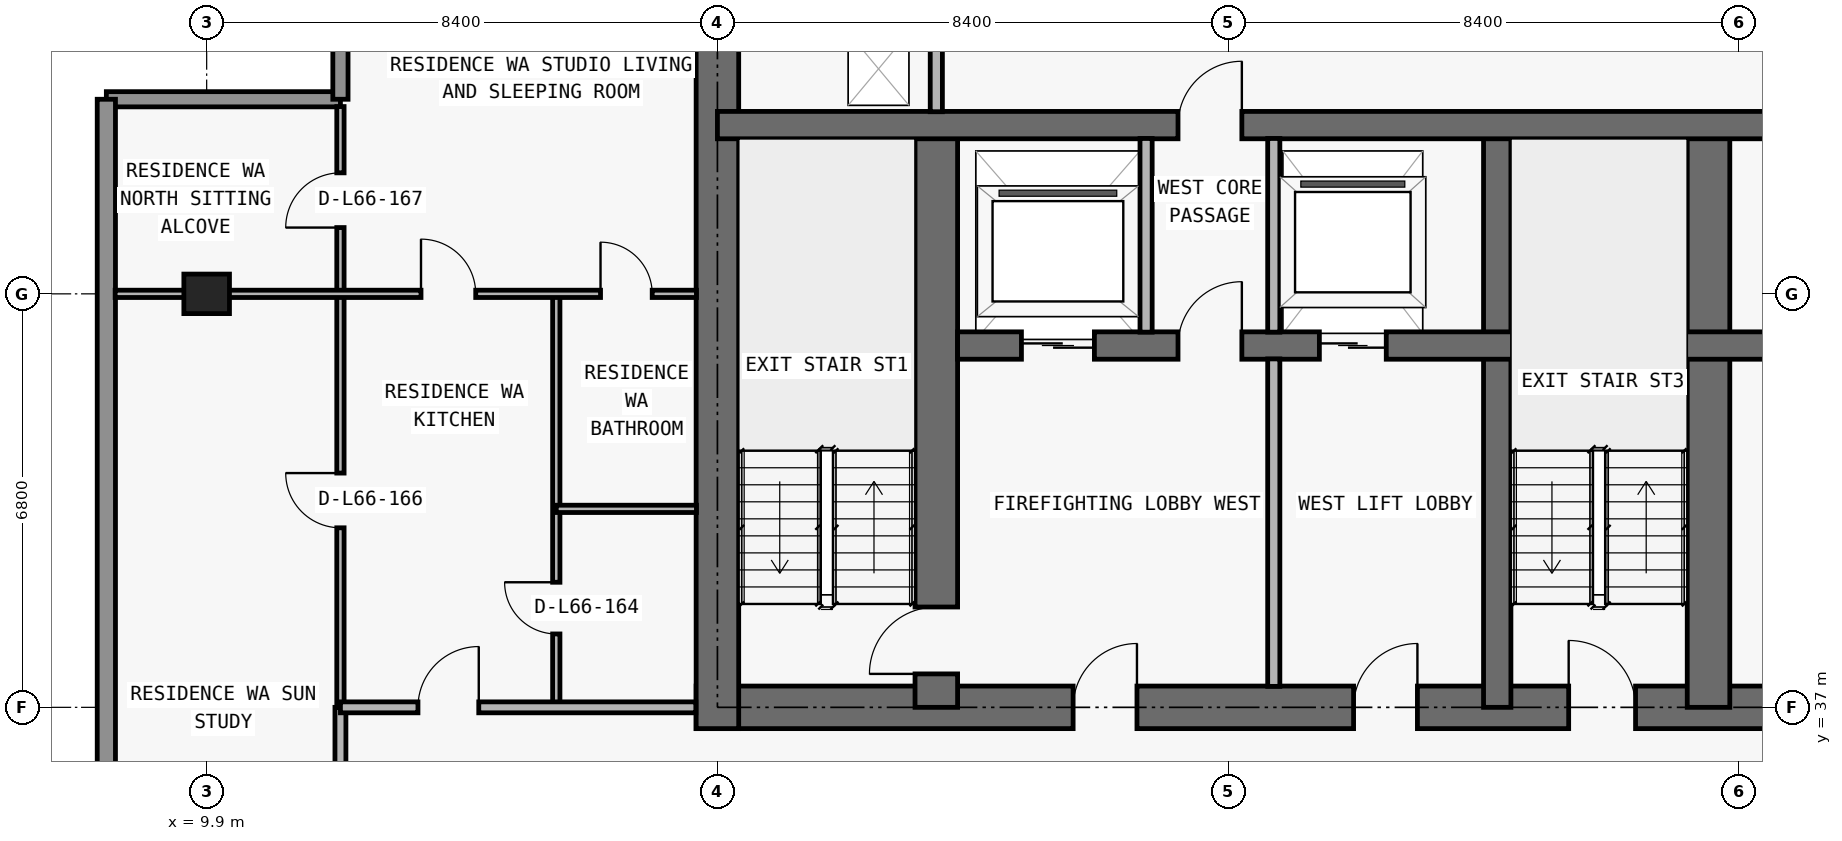
"""IFC4 building model, lengths in metres.
Left out: names, types, materials, properties, quantities, classifications, styles, units other than length and angle.
Written with IfcOpenShell. Run it as: python <this file> out.ifc"""

import sys

from ifc_helpers import new_model, si_unit, direction, frame, frame_2d, origin, origin_2d, place, context, subcontext, project, spatial, rectangle, extrude, element, fill, save


model = new_model("IFC4")
c1 = context("Model", 3, precision=1e-05, world=origin(), true_north=direction((0.0, 1.0)))
c2 = subcontext(c1, "Body", "Model", "MODEL_VIEW")
j1 = project(units=[si_unit("LENGTHUNIT", "METRE"), si_unit("PLANEANGLEUNIT", "RADIAN")], contexts=[c1])
p1 = place(None, origin())
s1 = spatial("IfcSite", under=j1, at=p1, CompositionType="ELEMENT")
p2 = place(p1, origin())
s2 = spatial("IfcBuilding", under=s1, at=p2, CompositionType="ELEMENT")
p3 = place(p2, frame((0.0, 0.0, 236.4)))
s3 = spatial("IfcBuildingStorey", under=s2, at=p3, CompositionType="ELEMENT", Elevation=236.4)
p4 = place(p3, frame((9.9, 43.8, 0.0), z_axis=(0.0, 0.0, 1.0), x_axis=(1.0, 0.0, 0.0)))
e1 = element("IfcColumn", 1, at=p4, inside=s3, PredefinedType="COLUMN", context=c2, shape_type="SweptSolid", body=[
    extrude(rectangle(XDim=0.75, YDim=0.65, at=origin_2d()), origin(), (0.0, 0.0, 1.0), 3.05),
])
p5 = place(p3, frame((17.95, 37.0, 0.0), z_axis=(0.0, 0.0, 1.0), x_axis=(1.0, 0.0, 0.0)))
e2 = element("IfcWall", 2, at=p5, inside=s3, PredefinedType="SHEAR", context=c2, shape_type="SweptSolid", body=[
    extrude(rectangle(XDim=41.9, YDim=0.7, at=frame_2d((20.95, 0.0))), origin(), (0.0, 0.0, 1.0), 3.05),
])
p6 = place(p5, frame((14.35, 0.0, 0.0)))
e3 = element("IfcOpeningElement", 3, at=p6, cuts=e2, PredefinedType="OPENING", context=c2, shape_type="SweptSolid", body=[
    extrude(rectangle(XDim=1.1, YDim=2.15, at=frame_2d((0.55, 1.075))), frame((0.0, 0.36, 0.0), z_axis=(0.0, -1.0, 0.0), x_axis=(1.0, 0.0, 0.0)), (0.0, 0.0, 1.0), 0.72),
])
p7 = place(p5, frame((6.2, 0.0, 0.0)))
e4 = element("IfcOpeningElement", 4, at=p7, cuts=e2, PredefinedType="OPENING", context=c2, shape_type="SweptSolid", body=[
    extrude(rectangle(XDim=1.05, YDim=2.15, at=frame_2d((0.525, 1.075))), frame((0.0, 0.36, 0.0), z_axis=(0.0, -1.0, 0.0), x_axis=(1.0, 0.0, 0.0)), (0.0, 0.0, 1.0), 0.72),
])
p8 = place(p5, frame((34.7, 0.0, 0.0)))
e5 = element("IfcOpeningElement", 5, at=p8, cuts=e2, PredefinedType="OPENING", context=c2, shape_type="SweptSolid", body=[
    extrude(rectangle(XDim=1.05, YDim=2.15, at=frame_2d((0.525, 1.075))), frame((0.0, 0.36, 0.0), z_axis=(0.0, -1.0, 0.0), x_axis=(1.0, 0.0, 0.0)), (0.0, 0.0, 1.0), 0.72),
])
p9 = place(p5, frame((10.812, 0.0, 0.0)))
e6 = element("IfcOpeningElement", 6, at=p9, cuts=e2, PredefinedType="OPENING", context=c2, shape_type="SweptSolid", body=[
    extrude(rectangle(XDim=1.05, YDim=2.15, at=frame_2d((0.525, 1.075))), frame((0.0, 0.36, 0.0), z_axis=(0.0, -1.0, 0.0), x_axis=(1.0, 0.0, 0.0)), (0.0, 0.0, 1.0), 0.72),
])
p10 = place(p5, frame((24.05, 0.0, 0.0)))
e7 = element("IfcOpeningElement", 7, at=p10, cuts=e2, PredefinedType="OPENING", context=c2, shape_type="SweptSolid", body=[
    extrude(rectangle(XDim=1.05, YDim=2.15, at=frame_2d((0.525, 1.075))), frame((0.0, 0.36, 0.0), z_axis=(0.0, -1.0, 0.0), x_axis=(1.0, 0.0, 0.0)), (0.0, 0.0, 1.0), 0.72),
])
p11 = place(p3, frame((18.3, 36.65, 0.0), z_axis=(0.0, 0.0, 1.0), x_axis=(0.0, 1.0, 0.0)))
e8 = element("IfcWall", 8, at=p11, inside=s3, PredefinedType="SHEAR", context=c2, shape_type="SweptSolid", body=[
    extrude(rectangle(XDim=13.95, YDim=0.7, at=frame_2d((6.975, 0.0))), origin(), (0.0, 0.0, 1.0), 3.05),
])
p12 = place(p3, frame((21.9, 37.0, 0.0), z_axis=(0.0, 0.0, 1.0), x_axis=(0.0, 1.0, 0.0)))
e9 = element("IfcWall", 9, at=p12, inside=s3, PredefinedType="SHEAR", context=c2, shape_type="SweptSolid", body=[
    extrude(rectangle(XDim=9.575, YDim=0.7, at=frame_2d((4.788, 0.0))), origin(), (0.0, 0.0, 1.0), 3.05),
])
p13 = place(p12, frame((0.55, 0.0, 0.0)))
e10 = element("IfcOpeningElement", 10, at=p13, cuts=e9, PredefinedType="OPENING", context=c2, shape_type="SweptSolid", body=[
    extrude(rectangle(XDim=1.1, YDim=2.15, at=frame_2d((0.55, 1.075))), frame((0.0, 0.36, 0.0), z_axis=(0.0, -1.0, 0.0), x_axis=(1.0, 0.0, 0.0)), (0.0, 0.0, 1.0), 0.72),
])
p14 = place(p3, frame((31.125, 37.0, 0.0), z_axis=(0.0, 0.0, 1.0), x_axis=(0.0, 1.0, 0.0)))
e11 = element("IfcWall", 11, at=p14, inside=s3, PredefinedType="SHEAR", context=c2, shape_type="SweptSolid", body=[
    extrude(rectangle(XDim=9.575, YDim=0.45, at=frame_2d((4.788, 0.0))), origin(), (0.0, 0.0, 1.0), 3.05),
])
p15 = place(p3, frame((34.6, 37.0, 0.0), z_axis=(0.0, 0.0, 1.0), x_axis=(0.0, 1.0, 0.0)))
e12 = element("IfcWall", 12, at=p15, inside=s3, PredefinedType="SHEAR", context=c2, shape_type="SweptSolid", body=[
    extrude(rectangle(XDim=9.575, YDim=0.7, at=frame_2d((4.788, 0.0))), origin(), (0.0, 0.0, 1.0), 3.05),
])
p16 = place(p3, frame((22.25, 42.95, 0.0), z_axis=(0.0, 0.0, 1.0), x_axis=(1.0, 0.0, 0.0)))
e13 = element("IfcWall", 13, at=p16, inside=s3, PredefinedType="SHEAR", context=c2, shape_type="SweptSolid", body=[
    extrude(rectangle(XDim=33.3, YDim=0.45, at=frame_2d((16.65, 0.0))), origin(), (0.0, 0.0, 1.0), 3.05),
])
p17 = place(p16, frame((1.05, 0.0, 0.0)))
e14 = element("IfcOpeningElement", 14, at=p17, cuts=e13, PredefinedType="OPENING", context=c2, shape_type="SweptSolid", body=[
    extrude(rectangle(XDim=1.2, YDim=2.2, at=frame_2d((0.6, 1.1))), frame((0.0, 0.235, 0.0), z_axis=(0.0, -1.0, 0.0), x_axis=(1.0, 0.0, 0.0)), (0.0, 0.0, 1.0), 0.47),
])
p18 = place(p16, frame((31.05, 0.0, 0.0)))
e15 = element("IfcOpeningElement", 15, at=p18, cuts=e13, PredefinedType="OPENING", context=c2, shape_type="SweptSolid", body=[
    extrude(rectangle(XDim=1.2, YDim=2.2, at=frame_2d((0.6, 1.1))), frame((0.0, 0.235, 0.0), z_axis=(0.0, -1.0, 0.0), x_axis=(1.0, 0.0, 0.0)), (0.0, 0.0, 1.0), 0.47),
])
p19 = place(p16, frame((26.45, 0.0, 0.0)))
e16 = element("IfcOpeningElement", 16, at=p19, cuts=e13, PredefinedType="OPENING", context=c2, shape_type="SweptSolid", body=[
    extrude(rectangle(XDim=1.1, YDim=2.2, at=frame_2d((0.55, 1.1))), frame((0.0, 0.235, 0.0), z_axis=(0.0, -1.0, 0.0), x_axis=(1.0, 0.0, 0.0)), (0.0, 0.0, 1.0), 0.47),
])
p20 = place(p16, frame((5.95, 0.0, 0.0)))
e17 = element("IfcOpeningElement", 17, at=p20, cuts=e13, PredefinedType="OPENING", context=c2, shape_type="SweptSolid", body=[
    extrude(rectangle(XDim=1.1, YDim=2.2, at=frame_2d((0.55, 1.1))), frame((0.0, 0.235, 0.0), z_axis=(0.0, -1.0, 0.0), x_axis=(1.0, 0.0, 0.0)), (0.0, 0.0, 1.0), 0.47),
])
p21 = place(p16, frame((3.625, 0.0, 0.0)))
e18 = element("IfcOpeningElement", 18, at=p21, cuts=e13, PredefinedType="OPENING", context=c2, shape_type="SweptSolid", body=[
    extrude(rectangle(XDim=1.05, YDim=2.15, at=frame_2d((0.525, 1.075))), frame((0.0, 0.235, 0.0), z_axis=(0.0, -1.0, 0.0), x_axis=(1.0, 0.0, 0.0)), (0.0, 0.0, 1.0), 0.47),
])
p22 = place(p16, frame((28.675, 0.0, 0.0)))
e19 = element("IfcOpeningElement", 19, at=p22, cuts=e13, PredefinedType="OPENING", context=c2, shape_type="SweptSolid", body=[
    extrude(rectangle(XDim=1.05, YDim=2.15, at=frame_2d((0.525, 1.075))), frame((0.0, 0.235, 0.0), z_axis=(0.0, -1.0, 0.0), x_axis=(1.0, 0.0, 0.0)), (0.0, 0.0, 1.0), 0.47),
])
p23 = place(p16, frame((15.225, 0.0, 0.0)))
e20 = element("IfcOpeningElement", 20, at=p23, cuts=e13, PredefinedType="OPENING", context=c2, shape_type="SweptSolid", body=[
    extrude(rectangle(XDim=1.0, YDim=2.2, at=frame_2d((0.5, 1.1))), frame((0.0, 0.235, 0.0), z_axis=(0.0, -1.0, 0.0), x_axis=(1.0, 0.0, 0.0)), (0.0, 0.0, 1.0), 0.47),
])
p24 = place(p16, frame((21.975, 0.0, 0.0)))
e21 = element("IfcOpeningElement", 21, at=p24, cuts=e13, PredefinedType="OPENING", context=c2, shape_type="SweptSolid", body=[
    extrude(rectangle(XDim=1.0, YDim=2.2, at=frame_2d((0.5, 1.1))), frame((0.0, 0.235, 0.0), z_axis=(0.0, -1.0, 0.0), x_axis=(1.0, 0.0, 0.0)), (0.0, 0.0, 1.0), 0.47),
])
p25 = place(p3, frame((18.3, 46.575, 0.0), z_axis=(0.0, 0.0, 1.0), x_axis=(1.0, 0.0, 0.0)))
e22 = element("IfcWall", 22, at=p25, inside=s3, PredefinedType="SHEAR", context=c2, shape_type="SweptSolid", body=[
    extrude(rectangle(XDim=41.2, YDim=0.45, at=frame_2d((20.6, 0.0))), origin(), (0.0, 0.0, 1.0), 3.05),
])
p26 = place(p25, frame((7.575, 0.0, 0.0)))
e23 = element("IfcOpeningElement", 23, at=p26, cuts=e22, PredefinedType="OPENING", context=c2, shape_type="SweptSolid", body=[
    extrude(rectangle(XDim=1.05, YDim=2.15, at=frame_2d((0.525, 1.075))), frame((0.0, 0.235, 0.0), z_axis=(0.0, -1.0, 0.0), x_axis=(1.0, 0.0, 0.0)), (0.0, 0.0, 1.0), 0.47),
])
p27 = place(p25, frame((32.625, 0.0, 0.0)))
e24 = element("IfcOpeningElement", 24, at=p27, cuts=e22, PredefinedType="OPENING", context=c2, shape_type="SweptSolid", body=[
    extrude(rectangle(XDim=1.05, YDim=2.15, at=frame_2d((0.525, 1.075))), frame((0.0, 0.235, 0.0), z_axis=(0.0, -1.0, 0.0), x_axis=(1.0, 0.0, 0.0)), (0.0, 0.0, 1.0), 0.47),
])
p28 = place(p3, frame((8.25, 47.0, 0.0), z_axis=(0.0, 0.0, 1.0), x_axis=(1.0, 0.0, 0.0)))
e25 = element("IfcWall", 25, at=p28, inside=s3, PredefinedType="ELEMENTEDWALL", context=c2, shape_type="SweptSolid", body=[
    extrude(rectangle(XDim=3.85, YDim=0.25, at=frame_2d((1.925, 0.0))), origin(), (0.0, 0.0, 1.0), 3.05),
])
p29 = place(p3, frame((12.1, 47.0, 0.0), z_axis=(0.0, 0.0, 1.0), x_axis=(0.0, 1.0, 0.0)))
e26 = element("IfcWall", 26, at=p29, inside=s3, PredefinedType="ELEMENTEDWALL", context=c2, shape_type="SweptSolid", body=[
    extrude(rectangle(XDim=3.45, YDim=0.25, at=frame_2d((1.725, 0.0))), origin(), (0.0, 0.0, 1.0), 3.05),
])
p30 = place(p3, frame((8.25, 30.15, 0.0), z_axis=(0.0, 0.0, 1.0), x_axis=(0.0, 1.0, 0.0)))
e27 = element("IfcWall", 27, at=p30, inside=s3, PredefinedType="STANDARD", context=c2, shape_type="SweptSolid", body=[
    extrude(rectangle(XDim=16.85, YDim=0.3, at=frame_2d((8.425, 0.0))), origin(), (0.0, 0.0, 1.0), 3.05),
])
p31 = place(p3, frame((12.1, 34.005, 0.0), z_axis=(0.0, 0.0, 1.0), x_axis=(0.0, 1.0, 0.0)))
e28 = element("IfcWall", 28, at=p31, inside=s3, PredefinedType="PARTITIONING", context=c2, shape_type="SweptSolid", body=[
    extrude(rectangle(XDim=2.995, YDim=0.18, at=frame_2d((1.498, 0.0))), origin(), (0.0, 0.0, 1.0), 2.578),
])
p32 = place(p3, frame((12.1, 37.005, 0.0), z_axis=(0.0, 0.0, 1.0), x_axis=(0.0, 1.0, 0.0)))
e29 = element("IfcWall", 29, at=p32, inside=s3, PredefinedType="PARTITIONING", context=c2, shape_type="SweptSolid", body=[
    extrude(rectangle(XDim=9.875, YDim=0.12, at=frame_2d((4.938, 0.0))), origin(), (0.0, 0.0, 1.0), 2.578),
])
p33 = place(p32, frame((2.948, 0.0, 0.0)))
e30 = element("IfcOpeningElement", 30, at=p33, cuts=e29, PredefinedType="OPENING", context=c2, shape_type="SweptSolid", body=[
    extrude(rectangle(XDim=0.9, YDim=2.15, at=frame_2d((0.45, 1.075))), frame((0.0, 0.07, 0.0), z_axis=(0.0, -1.0, 0.0), x_axis=(1.0, 0.0, 0.0)), (0.0, 0.0, 1.0), 0.14),
])
p34 = place(p32, frame((7.885, 0.0, 0.0)))
e31 = element("IfcOpeningElement", 31, at=p34, cuts=e29, PredefinedType="OPENING", context=c2, shape_type="SweptSolid", body=[
    extrude(rectangle(XDim=0.9, YDim=2.15, at=frame_2d((0.45, 1.075))), frame((0.0, 0.07, 0.0), z_axis=(0.0, -1.0, 0.0), x_axis=(1.0, 0.0, 0.0)), (0.0, 0.0, 1.0), 0.14),
])
p35 = place(p3, frame((15.65, 37.0, 0.0), z_axis=(0.0, 0.0, 1.0), x_axis=(0.0, 1.0, 0.0)))
e32 = element("IfcWall", 32, at=p35, inside=s3, PredefinedType="PARTITIONING", context=c2, shape_type="SweptSolid", body=[
    extrude(rectangle(XDim=6.8, YDim=0.12, at=frame_2d((3.4, 0.0))), origin(), (0.0, 0.0, 1.0), 3.05),
])
p36 = place(p35, frame((1.207, 0.0, 0.0)))
e33 = element("IfcOpeningElement", 33, at=p36, cuts=e32, PredefinedType="OPENING", context=c2, shape_type="SweptSolid", body=[
    extrude(rectangle(XDim=0.85, YDim=2.1, at=frame_2d((0.425, 1.05))), frame((0.0, 0.07, 0.0), z_axis=(0.0, -1.0, 0.0), x_axis=(1.0, 0.0, 0.0)), (0.0, 0.0, 1.0), 0.14),
])
p37 = place(p3, frame((21.9, 46.795, 0.0), z_axis=(0.0, 0.0, 1.0), x_axis=(0.0, 1.0, 0.0)))
e34 = element("IfcWall", 34, at=p37, inside=s3, PredefinedType="PARTITIONING", context=c2, shape_type="SweptSolid", body=[
    extrude(rectangle(XDim=3.16, YDim=0.2, at=frame_2d((1.58, 0.0))), origin(), (0.0, 0.0, 1.0), 3.05),
])
p38 = place(p3, frame((25.35, 43.17, 0.0), z_axis=(0.0, 0.0, 1.0), x_axis=(0.0, 1.0, 0.0)))
e35 = element("IfcWall", 35, at=p38, inside=s3, PredefinedType="PARTITIONING", context=c2, shape_type="SweptSolid", body=[
    extrude(rectangle(XDim=3.185, YDim=0.2, at=frame_2d((1.593, 0.0))), origin(), (0.0, 0.0, 1.0), 3.05),
])
p39 = place(p3, frame((27.45, 37.345, 0.0), z_axis=(0.0, 0.0, 1.0), x_axis=(0.0, 1.0, 0.0)))
e36 = element("IfcWall", 36, at=p39, inside=s3, PredefinedType="PARTITIONING", context=c2, shape_type="SweptSolid", body=[
    extrude(rectangle(XDim=5.385, YDim=0.2, at=frame_2d((2.692, 0.0))), origin(), (0.0, 0.0, 1.0), 3.05),
])
p40 = place(p3, frame((27.45, 43.17, 0.0), z_axis=(0.0, 0.0, 1.0), x_axis=(0.0, 1.0, 0.0)))
e37 = element("IfcWall", 37, at=p40, inside=s3, PredefinedType="PARTITIONING", context=c2, shape_type="SweptSolid", body=[
    extrude(rectangle(XDim=3.185, YDim=0.2, at=frame_2d((1.593, 0.0))), origin(), (0.0, 0.0, 1.0), 3.05),
])
p41 = place(p3, frame((12.1, 37.0, 0.0), z_axis=(0.0, 0.0, 1.0), x_axis=(1.0, 0.0, 0.0)))
e38 = element("IfcWall", 38, at=p41, inside=s3, PredefinedType="PARTITIONING", context=c2, shape_type="SweptSolid", body=[
    extrude(rectangle(XDim=5.845, YDim=0.18, at=frame_2d((2.922, 0.0))), origin(), (0.0, 0.0, 1.0), 3.05),
])
p42 = place(p41, frame((1.275, 0.0, 0.0)))
e39 = element("IfcOpeningElement", 39, at=p42, cuts=e38, PredefinedType="OPENING", context=c2, shape_type="SweptSolid", body=[
    extrude(rectangle(XDim=1.0, YDim=2.2, at=frame_2d((0.5, 1.1))), frame((0.0, 0.1, 0.0), z_axis=(0.0, -1.0, 0.0), x_axis=(1.0, 0.0, 0.0)), (0.0, 0.0, 1.0), 0.2),
])
p43 = place(p3, frame((15.65, 40.264, 0.0), z_axis=(0.0, 0.0, 1.0), x_axis=(1.0, 0.0, 0.0)))
e40 = element("IfcWall", 40, at=p43, inside=s3, PredefinedType="PARTITIONING", context=c2, shape_type="SweptSolid", body=[
    extrude(rectangle(XDim=2.305, YDim=0.12, at=frame_2d((1.153, 0.0))), origin(), (0.0, 0.0, 1.0), 3.05),
])
p44 = place(p3, frame((8.395, 43.8, 0.0), z_axis=(0.0, 0.0, 1.0), x_axis=(1.0, 0.0, 0.0)))
e41 = element("IfcWall", 41, at=p44, inside=s3, PredefinedType="PARTITIONING", context=c2, shape_type="SweptSolid", body=[
    extrude(rectangle(XDim=9.56, YDim=0.12, at=frame_2d((4.78, 0.0))), origin(), (0.0, 0.0, 1.0), 2.418),
])
p45 = place(p44, frame((5.03, 0.0, 0.0)))
e42 = element("IfcOpeningElement", 42, at=p45, cuts=e41, PredefinedType="OPENING", context=c2, shape_type="SweptSolid", body=[
    extrude(rectangle(XDim=0.9, YDim=2.15, at=frame_2d((0.45, 1.075))), frame((0.0, 0.07, 0.0), z_axis=(0.0, -1.0, 0.0), x_axis=(1.0, 0.0, 0.0)), (0.0, 0.0, 1.0), 0.14),
])
p46 = place(p44, frame((7.982, 0.0, 0.0)))
e43 = element("IfcOpeningElement", 43, at=p46, cuts=e41, PredefinedType="OPENING", context=c2, shape_type="SweptSolid", body=[
    extrude(rectangle(XDim=0.85, YDim=2.1, at=frame_2d((0.425, 1.05))), frame((0.0, 0.07, 0.0), z_axis=(0.0, -1.0, 0.0), x_axis=(1.0, 0.0, 0.0)), (0.0, 0.0, 1.0), 0.14),
])
p47 = place(p17, origin())
e44 = element("IfcDoor", 44, at=p47, inside=s3, OperationType="DOUBLE_DOOR_SLIDING", PredefinedType="DOOR", context=c2, shape_type="SweptSolid", body=[
    extrude(rectangle(XDim=1.2, YDim=2.2, at=frame_2d((0.6, 1.1))), frame((0.0, 0.025, 0.0), z_axis=(0.0, -1.0, 0.0), x_axis=(1.0, 0.0, 0.0)), (0.0, 0.0, 1.0), 0.05),
])
fill(e14, e44)
p48 = place(p20, origin())
e45 = element("IfcDoor", 45, at=p48, inside=s3, OperationType="DOUBLE_DOOR_SLIDING", PredefinedType="DOOR", context=c2, shape_type="SweptSolid", body=[
    extrude(rectangle(XDim=1.1, YDim=2.2, at=frame_2d((0.55, 1.1))), frame((0.0, 0.025, 0.0), z_axis=(0.0, -1.0, 0.0), x_axis=(1.0, 0.0, 0.0)), (0.0, 0.0, 1.0), 0.05),
])
fill(e17, e45)
p49 = place(p6, origin())
e46 = element("IfcDoor", 46, at=p49, inside=s3, OperationType="SINGLE_SWING_LEFT", PredefinedType="DOOR", context=c2, shape_type="SweptSolid", body=[
    extrude(rectangle(XDim=1.1, YDim=2.15, at=frame_2d((0.55, 1.075))), frame((0.0, 0.025, 0.0), z_axis=(0.0, -1.0, 0.0), x_axis=(1.0, 0.0, 0.0)), (0.0, 0.0, 1.0), 0.05),
])
fill(e3, e46)
p50 = place(p7, origin())
e47 = element("IfcDoor", 47, at=p50, inside=s3, OperationType="SINGLE_SWING_RIGHT", PredefinedType="DOOR", context=c2, shape_type="SweptSolid", body=[
    extrude(rectangle(XDim=1.05, YDim=2.15, at=frame_2d((0.525, 1.075))), frame((0.0, 0.025, 0.0), z_axis=(0.0, -1.0, 0.0), x_axis=(1.0, 0.0, 0.0)), (0.0, 0.0, 1.0), 0.05),
])
fill(e4, e47)
p51 = place(p13, origin())
e48 = element("IfcDoor", 48, at=p51, inside=s3, OperationType="SINGLE_SWING_LEFT", PredefinedType="DOOR", context=c2, shape_type="SweptSolid", body=[
    extrude(rectangle(XDim=1.1, YDim=2.15, at=frame_2d((0.55, 1.075))), frame((0.0, 0.025, 0.0), z_axis=(0.0, -1.0, 0.0), x_axis=(1.0, 0.0, 0.0)), (0.0, 0.0, 1.0), 0.05),
])
fill(e10, e48)
p52 = place(p21, origin())
e49 = element("IfcDoor", 49, at=p52, inside=s3, OperationType="SINGLE_SWING_RIGHT", PredefinedType="DOOR", context=c2, shape_type="SweptSolid", body=[
    extrude(rectangle(XDim=1.05, YDim=2.15, at=frame_2d((0.525, 1.075))), frame((0.0, 0.025, 0.0), z_axis=(0.0, -1.0, 0.0), x_axis=(1.0, 0.0, 0.0)), (0.0, 0.0, 1.0), 0.05),
])
fill(e18, e49)
p53 = place(p9, origin())
e50 = element("IfcDoor", 50, at=p53, inside=s3, OperationType="SINGLE_SWING_RIGHT", PredefinedType="DOOR", context=c2, shape_type="SweptSolid", body=[
    extrude(rectangle(XDim=1.05, YDim=2.15, at=frame_2d((0.525, 1.075))), frame((0.0, 0.025, 0.0), z_axis=(0.0, -1.0, 0.0), x_axis=(1.0, 0.0, 0.0)), (0.0, 0.0, 1.0), 0.05),
])
fill(e6, e50)
p54 = place(p26, origin())
e51 = element("IfcDoor", 51, at=p54, inside=s3, OperationType="SINGLE_SWING_RIGHT", PredefinedType="DOOR", context=c2, shape_type="SweptSolid", body=[
    extrude(rectangle(XDim=1.05, YDim=2.15, at=frame_2d((0.525, 1.075))), frame((0.0, 0.025, 0.0), z_axis=(0.0, -1.0, 0.0), x_axis=(1.0, 0.0, 0.0)), (0.0, 0.0, 1.0), 0.05),
])
fill(e23, e51)
p55 = place(p42, origin())
e52 = element("IfcDoor", 52, at=p55, inside=s3, OperationType="SINGLE_SWING_RIGHT", PredefinedType="DOOR", context=c2, shape_type="SweptSolid", body=[
    extrude(rectangle(XDim=1.0, YDim=2.2, at=frame_2d((0.5, 1.1))), frame((0.0, 0.025, 0.0), z_axis=(0.0, -1.0, 0.0), x_axis=(1.0, 0.0, 0.0)), (0.0, 0.0, 1.0), 0.05),
])
fill(e39, e52)
p56 = place(p45, origin())
e53 = element("IfcDoor", 53, at=p56, inside=s3, OperationType="SINGLE_SWING_LEFT", PredefinedType="DOOR", context=c2, shape_type="SweptSolid", body=[
    extrude(rectangle(XDim=0.9, YDim=2.15, at=frame_2d((0.45, 1.075))), frame((0.0, 0.025, 0.0), z_axis=(0.0, -1.0, 0.0), x_axis=(1.0, 0.0, 0.0)), (0.0, 0.0, 1.0), 0.05),
])
fill(e42, e53)
p57 = place(p36, origin())
e54 = element("IfcDoor", 54, at=p57, inside=s3, OperationType="SINGLE_SWING_RIGHT", PredefinedType="DOOR", context=c2, shape_type="SweptSolid", body=[
    extrude(rectangle(XDim=0.85, YDim=2.1, at=frame_2d((0.425, 1.05))), frame((0.0, 0.025, 0.0), z_axis=(0.0, -1.0, 0.0), x_axis=(1.0, 0.0, 0.0)), (0.0, 0.0, 1.0), 0.05),
])
fill(e33, e54)
p58 = place(p46, origin())
e55 = element("IfcDoor", 55, at=p58, inside=s3, OperationType="SINGLE_SWING_LEFT", PredefinedType="DOOR", context=c2, shape_type="SweptSolid", body=[
    extrude(rectangle(XDim=0.85, YDim=2.1, at=frame_2d((0.425, 1.05))), frame((0.0, 0.025, 0.0), z_axis=(0.0, -1.0, 0.0), x_axis=(1.0, 0.0, 0.0)), (0.0, 0.0, 1.0), 0.05),
])
fill(e43, e55)
p59 = place(p33, origin())
e56 = element("IfcDoor", 56, at=p59, inside=s3, OperationType="SINGLE_SWING_RIGHT", PredefinedType="DOOR", context=c2, shape_type="SweptSolid", body=[
    extrude(rectangle(XDim=0.9, YDim=2.15, at=frame_2d((0.45, 1.075))), frame((0.0, 0.025, 0.0), z_axis=(0.0, -1.0, 0.0), x_axis=(1.0, 0.0, 0.0)), (0.0, 0.0, 1.0), 0.05),
])
fill(e30, e56)
p60 = place(p34, origin())
e57 = element("IfcDoor", 57, at=p60, inside=s3, OperationType="SINGLE_SWING_LEFT", PredefinedType="DOOR", context=c2, shape_type="SweptSolid", body=[
    extrude(rectangle(XDim=0.9, YDim=2.15, at=frame_2d((0.45, 1.075))), frame((0.0, 0.025, 0.0), z_axis=(0.0, -1.0, 0.0), x_axis=(1.0, 0.0, 0.0)), (0.0, 0.0, 1.0), 0.05),
])
fill(e31, e57)
save(model, sys.argv[1])
